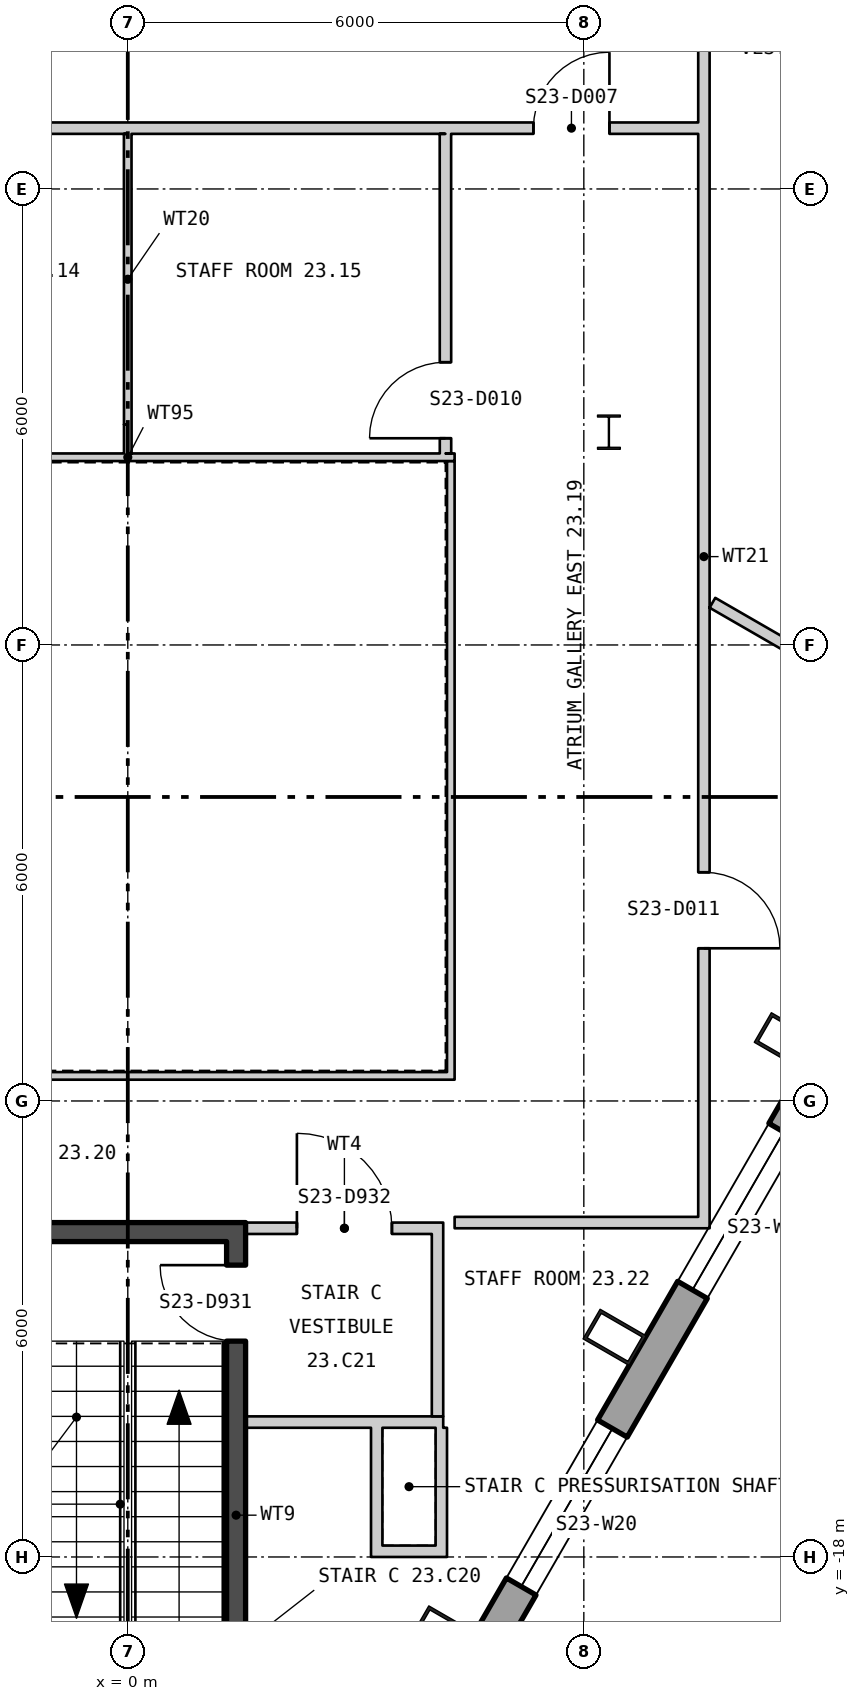
"""IFC4 building model, lengths in metres.
Left out: names, types, materials, properties, quantities, classifications, styles, units other than length and angle.
Written with IfcOpenShell. Run it as: python <this file> out.ifc"""

import sys

from ifc_helpers import new_model, si_unit, direction, frame, frame_2d, origin, origin_2d, place, context, subcontext, project, spatial, polyline, rectangle, hollow_rectangle, i_section, outline, extrude, element, fill, save


model = new_model("IFC4")
c1 = context("Model", 3, precision=1e-05, world=origin(), true_north=direction((0.0, 1.0)))
c2 = subcontext(c1, "Body", "Model", "MODEL_VIEW")
j1 = project(units=[si_unit("LENGTHUNIT", "METRE"), si_unit("PLANEANGLEUNIT", "RADIAN")], contexts=[c1])
p1 = place(None, origin())
s1 = spatial("IfcSite", under=j1, at=p1, CompositionType="ELEMENT")
p2 = place(p1, origin())
s2 = spatial("IfcBuilding", under=s1, at=p2, CompositionType="ELEMENT")
p3 = place(p2, frame((0.0, 0.0, 304.2)))
s3 = spatial("IfcBuildingStorey", under=s2, at=p3, CompositionType="ELEMENT", Elevation=304.2)
for number, where, z_axis, x_axis in (
    (1, (4.151, -19.013, 0.0), (0.0, 0.0, 1.0), (0.5, 0.866, 0.0)),
    (2, (6.405, -15.11, 0.0), (0.0, 0.0, 1.0), (0.5, 0.866, 0.0)),
    (3, (8.658, -11.208, 0.0), (0.0, 0.0, 1.0), (0.5, 0.866, 0.0)),
):
    element("IfcColumn", number, at=place(p3, frame(where, z_axis=z_axis, x_axis=x_axis)), inside=s3, PredefinedType="COLUMN", context=c2, shape_type="SweptSolid", body=[
        extrude(hollow_rectangle(XDim=0.45, YDim=0.7, WallThickness=0.04, at=origin_2d()), origin(), (0.0, 0.0, 1.0), 4.2),
    ])
p4 = place(p3, frame((6.33, -3.2, 0.0), z_axis=(0.0, 0.0, 1.0), x_axis=(1.0, 0.0, 0.0)))
e4 = element("IfcColumn", 4, at=p4, inside=s3, PredefinedType="COLUMN", context=c2, shape_type="SweptSolid", body=[
    extrude(i_section(OverallWidth=0.3, OverallDepth=0.45, WebThickness=0.014, FlangeThickness=0.026, at=origin_2d()), origin(), (0.0, 0.0, 1.0), 4.2),
])
p5 = place(p3, frame((2.23, -23.491, -0.18), z_axis=(0.0, 0.0, 1.0), x_axis=(0.500000141277, 0.866025322218, 0.0)))
e5 = element("IfcWall", 5, at=p5, inside=s3, PredefinedType="SOLIDWALL", context=c2, shape_type="SweptSolid", body=[
    extrude(outline(polyline([(-0.13, -0.225), (45.86, -0.225), (45.6, 0.225), (0.13, 0.225), (-0.13, -0.225)])), origin(), (0.0, 0.0, 1.0), 3.98),
])
p6 = place(p5, frame((1.424, 0.0, 1.08)))
e6 = element("IfcOpeningElement", 6, at=p6, cuts=e5, PredefinedType="OPENING", context=c2, shape_type="SweptSolid", body=[
    extrude(rectangle(XDim=2.4, YDim=2.3, at=frame_2d((1.2, 1.15))), frame((0.0, 0.235, 0.0), z_axis=(0.0, -1.0, 0.0), x_axis=(1.0, 0.0, 0.0)), (0.0, 0.0, 1.0), 0.47),
])
p7 = place(p5, frame((5.892, 0.0, 1.08)))
e7 = element("IfcOpeningElement", 7, at=p7, cuts=e5, PredefinedType="OPENING", context=c2, shape_type="SweptSolid", body=[
    extrude(rectangle(XDim=2.4, YDim=2.3, at=frame_2d((1.2, 1.15))), frame((0.0, 0.235, 0.0), z_axis=(0.0, -1.0, 0.0), x_axis=(1.0, 0.0, 0.0)), (0.0, 0.0, 1.0), 0.47),
])
p8 = place(p5, frame((10.399, 0.0, 1.08)))
e8 = element("IfcOpeningElement", 8, at=p8, cuts=e5, PredefinedType="OPENING", context=c2, shape_type="SweptSolid", body=[
    extrude(rectangle(XDim=2.4, YDim=2.3, at=frame_2d((1.2, 1.15))), frame((0.0, 0.235, 0.0), z_axis=(0.0, -1.0, 0.0), x_axis=(1.0, 0.0, 0.0)), (0.0, 0.0, 1.0), 0.47),
])
p9 = place(p5, frame((14.905, 0.0, 1.08)))
e9 = element("IfcOpeningElement", 9, at=p9, cuts=e5, PredefinedType="OPENING", context=c2, shape_type="SweptSolid", body=[
    extrude(rectangle(XDim=2.4, YDim=2.3, at=frame_2d((1.2, 1.15))), frame((0.0, 0.235, 0.0), z_axis=(0.0, -1.0, 0.0), x_axis=(1.0, 0.0, 0.0)), (0.0, 0.0, 1.0), 0.47),
])
p10 = place(p5, frame((19.412, 0.0, 1.08)))
e10 = element("IfcOpeningElement", 10, at=p10, cuts=e5, PredefinedType="OPENING", context=c2, shape_type="SweptSolid", body=[
    extrude(rectangle(XDim=2.4, YDim=2.3, at=frame_2d((1.2, 1.15))), frame((0.0, 0.235, 0.0), z_axis=(0.0, -1.0, 0.0), x_axis=(1.0, 0.0, 0.0)), (0.0, 0.0, 1.0), 0.47),
])
p11 = place(p5, frame((23.918, 0.0, 1.08)))
e11 = element("IfcOpeningElement", 11, at=p11, cuts=e5, PredefinedType="OPENING", context=c2, shape_type="SweptSolid", body=[
    extrude(rectangle(XDim=2.4, YDim=2.3, at=frame_2d((1.2, 1.15))), frame((0.0, 0.235, 0.0), z_axis=(0.0, -1.0, 0.0), x_axis=(1.0, 0.0, 0.0)), (0.0, 0.0, 1.0), 0.47),
])
p12 = place(p5, frame((28.425, 0.0, 1.08)))
e12 = element("IfcOpeningElement", 12, at=p12, cuts=e5, PredefinedType="OPENING", context=c2, shape_type="SweptSolid", body=[
    extrude(rectangle(XDim=2.4, YDim=2.3, at=frame_2d((1.2, 1.15))), frame((0.0, 0.235, 0.0), z_axis=(0.0, -1.0, 0.0), x_axis=(1.0, 0.0, 0.0)), (0.0, 0.0, 1.0), 0.47),
])
p13 = place(p5, frame((32.932, 0.0, 1.08)))
e13 = element("IfcOpeningElement", 13, at=p13, cuts=e5, PredefinedType="OPENING", context=c2, shape_type="SweptSolid", body=[
    extrude(rectangle(XDim=2.4, YDim=2.3, at=frame_2d((1.2, 1.15))), frame((0.0, 0.235, 0.0), z_axis=(0.0, -1.0, 0.0), x_axis=(1.0, 0.0, 0.0)), (0.0, 0.0, 1.0), 0.47),
])
p14 = place(p5, frame((37.438, 0.0, 1.08)))
e14 = element("IfcOpeningElement", 14, at=p14, cuts=e5, PredefinedType="OPENING", context=c2, shape_type="SweptSolid", body=[
    extrude(rectangle(XDim=2.4, YDim=2.3, at=frame_2d((1.2, 1.15))), frame((0.0, 0.235, 0.0), z_axis=(0.0, -1.0, 0.0), x_axis=(1.0, 0.0, 0.0)), (0.0, 0.0, 1.0), 0.47),
])
p15 = place(p5, frame((41.907, 0.0, 1.08)))
e15 = element("IfcOpeningElement", 15, at=p15, cuts=e5, PredefinedType="OPENING", context=c2, shape_type="SweptSolid", body=[
    extrude(rectangle(XDim=2.4, YDim=2.3, at=frame_2d((1.2, 1.15))), frame((0.0, 0.235, 0.0), z_axis=(0.0, -1.0, 0.0), x_axis=(1.0, 0.0, 0.0)), (0.0, 0.0, 1.0), 0.47),
])
p16 = place(p3, frame((-4.3, -11.67, 0.0), z_axis=(0.0, 0.0, 1.0), x_axis=(1.0, 0.0, 0.0)))
e16 = element("IfcWall", 16, at=p16, inside=s3, PredefinedType="PARTITIONING", context=c2, shape_type="SweptSolid", body=[
    extrude(rectangle(XDim=8.6, YDim=0.1, at=frame_2d((4.3, 0.0))), origin(), (0.0, 0.0, 1.0), 4.0),
])
p17 = place(p3, frame((4.25, -11.62, 0.0), z_axis=(0.0, 0.0, 1.0), x_axis=(0.0, 1.0, 0.0)))
e17 = element("IfcWall", 17, at=p17, inside=s3, PredefinedType="PARTITIONING", context=c2, shape_type="SweptSolid", body=[
    extrude(rectangle(XDim=8.04, YDim=0.1, at=frame_2d((4.02, 0.0))), origin(), (0.0, 0.0, 1.0), 4.0),
])
p18 = place(p3, frame((4.3, -3.53, 0.0), z_axis=(0.0, 0.0, 1.0), x_axis=(-1.0, 0.0, 0.0)))
e18 = element("IfcWall", 18, at=p18, inside=s3, PredefinedType="PARTITIONING", context=c2, shape_type="SweptSolid", body=[
    extrude(rectangle(XDim=8.6, YDim=0.1, at=frame_2d((4.3, 0.0))), origin(), (0.0, 0.0, 1.0), 4.0),
])
p19 = place(p3, frame((1.425, -21.05, 0.0), z_axis=(0.0, 0.0, 1.0), x_axis=(0.0, 1.0, 0.0)))
e19 = element("IfcWall", 19, at=p19, inside=s3, PredefinedType="SHEAR", context=c2, shape_type="SweptSolid", body=[
    extrude(rectangle(XDim=7.2, YDim=0.25, at=frame_2d((3.6, 0.0))), origin(), (0.0, 0.0, 1.0), 4.0),
])
p20 = place(p19, frame((5.89, 0.0, 0.0)))
e20 = element("IfcOpeningElement", 20, at=p20, cuts=e19, PredefinedType="OPENING", context=c2, shape_type="SweptSolid", body=[
    extrude(rectangle(XDim=1.0, YDim=2.1, at=frame_2d((0.5, 1.05))), frame((0.0, 0.135, 0.0), z_axis=(0.0, -1.0, 0.0), x_axis=(1.0, 0.0, 0.0)), (0.0, 0.0, 1.0), 0.27),
])
p21 = place(p3, frame((-1.55, -13.725, 0.0), z_axis=(0.0, 0.0, 1.0), x_axis=(1.0, 0.0, 0.0)))
e21 = element("IfcWall", 21, at=p21, inside=s3, PredefinedType="SHEAR", context=c2, shape_type="SweptSolid", body=[
    extrude(rectangle(XDim=3.1, YDim=0.25, at=frame_2d((1.55, 0.0))), origin(), (0.0, 0.0, 1.0), 4.0),
])
p22 = place(p3, frame((1.55, -16.225, 0.0), z_axis=(0.0, 0.0, 1.0), x_axis=(1.0, 0.0, 0.0)))
e22 = element("IfcWall", 22, at=p22, inside=s3, PredefinedType="PARTITIONING", context=c2, shape_type="SweptSolid", body=[
    extrude(rectangle(XDim=2.6, YDim=0.15, at=frame_2d((1.3, 0.0))), origin(), (0.0, 0.0, 1.0), 4.0),
])
p23 = place(p3, frame((4.075, -16.15, 0.0), z_axis=(0.0, 0.0, 1.0), x_axis=(0.0, 1.0, 0.0)))
e23 = element("IfcWall", 23, at=p23, inside=s3, PredefinedType="PARTITIONING", context=c2, shape_type="SweptSolid", body=[
    extrude(rectangle(XDim=2.4, YDim=0.15, at=frame_2d((1.2, 0.0))), origin(), (0.0, 0.0, 1.0), 4.0),
])
p24 = place(p3, frame((1.55, -13.675, 0.0), z_axis=(0.0, 0.0, 1.0), x_axis=(1.0, 0.0, 0.0)))
e24 = element("IfcWall", 24, at=p24, inside=s3, PredefinedType="PARTITIONING", context=c2, shape_type="SweptSolid", body=[
    extrude(rectangle(XDim=2.6, YDim=0.15, at=frame_2d((1.3, 0.0))), origin(), (0.0, 0.0, 1.0), 3.186),
])
p25 = place(p24, frame((0.675, 0.0, 0.0)))
e25 = element("IfcOpeningElement", 25, at=p25, cuts=e24, PredefinedType="OPENING", context=c2, shape_type="SweptSolid", body=[
    extrude(rectangle(XDim=1.25, YDim=2.1, at=frame_2d((0.625, 1.05))), frame((0.0, 0.085, 0.0), z_axis=(0.0, -1.0, 0.0), x_axis=(1.0, 0.0, 0.0)), (0.0, 0.0, 1.0), 0.17),
])
p26 = place(p3, frame((3.275, -18.0, 0.0), z_axis=(0.0, 0.0, 1.0), x_axis=(0.0, 1.0, 0.0)))
e26 = element("IfcWall", 26, at=p26, inside=s3, PredefinedType="PARTITIONING", context=c2, shape_type="SweptSolid", body=[
    extrude(rectangle(XDim=1.7, YDim=0.15, at=frame_2d((0.85, 0.0))), origin(), (0.0, 0.0, 1.0), 3.55),
])
p27 = place(p3, frame((3.35, -17.925, 0.0), z_axis=(0.0, 0.0, 1.0), x_axis=(1.0, 0.0, 0.0)))
e27 = element("IfcWall", 27, at=p27, inside=s3, PredefinedType="PARTITIONING", context=c2, shape_type="SweptSolid", body=[
    extrude(rectangle(XDim=0.7, YDim=0.15, at=frame_2d((0.35, 0.0))), origin(), (0.0, 0.0, 1.0), 4.0),
])
p28 = place(p3, frame((4.125, -18.0, 0.0), z_axis=(0.0, 0.0, 1.0), x_axis=(0.0, 1.0, 0.0)))
e28 = element("IfcWall", 28, at=p28, inside=s3, PredefinedType="PARTITIONING", context=c2, shape_type="SweptSolid", body=[
    extrude(rectangle(XDim=1.7, YDim=0.15, at=frame_2d((0.85, 0.0))), origin(), (0.0, 0.0, 1.0), 4.0),
])
p29 = place(p3, frame((-7.58, 0.8, 0.0), z_axis=(0.0, 0.0, 1.0), x_axis=(1.0, 0.0, 0.0)))
e29 = element("IfcWall", 29, at=p29, inside=s3, PredefinedType="PARTITIONING", context=c2, shape_type="SweptSolid", body=[
    extrude(rectangle(XDim=15.085, YDim=0.15, at=frame_2d((7.543, 0.0))), origin(), (0.0, 0.0, 1.0), 4.0),
])
p30 = place(p29, frame((1.206, 0.0, 0.0)))
e30 = element("IfcOpeningElement", 30, at=p30, cuts=e29, PredefinedType="OPENING", context=c2, shape_type="SweptSolid", body=[
    extrude(rectangle(XDim=1.0, YDim=2.1, at=frame_2d((0.5, 1.05))), frame((0.0, 0.085, 0.0), z_axis=(0.0, -1.0, 0.0), x_axis=(1.0, 0.0, 0.0)), (0.0, 0.0, 1.0), 0.17),
])
p31 = place(p29, frame((12.917, 0.0, 0.0)))
e31 = element("IfcOpeningElement", 31, at=p31, cuts=e29, PredefinedType="OPENING", context=c2, shape_type="SweptSolid", body=[
    extrude(rectangle(XDim=1.0, YDim=2.1, at=frame_2d((0.5, 1.05))), frame((0.0, 0.085, 0.0), z_axis=(0.0, -1.0, 0.0), x_axis=(1.0, 0.0, 0.0)), (0.0, 0.0, 1.0), 0.17),
])
p32 = place(p3, frame((-0.001, 0.725, 0.0), z_axis=(0.0, 0.0, 1.0), x_axis=(0.000235294111, -0.999999972318, 0.0)))
e32 = element("IfcWall", 32, at=p32, inside=s3, PredefinedType="PARTITIONING", context=c2, shape_type="SweptSolid", body=[
    extrude(rectangle(XDim=3.825, YDim=0.1, at=frame_2d((1.913, 0.0))), origin(), (0.0, 0.0, 1.0), 3.55),
])
p33 = place(p3, frame((-0.0, -3.1, 0.0), z_axis=(0.0, 0.0, 1.0), x_axis=(0.000263157886, -0.999999965374, 0.0)))
e33 = element("IfcWall", 33, at=p33, inside=s3, PredefinedType="PARTITIONING", context=c2, shape_type="SweptSolid", body=[
    extrude(rectangle(XDim=0.38, YDim=0.1, at=frame_2d((0.19, 0.0))), origin(), (0.0, 0.0, 1.0), 4.0),
])
p34 = place(p3, frame((4.179, 0.725, 0.0), z_axis=(0.0, 0.0, 1.0), x_axis=(0.000237812122, -0.999999971723, 0.0)))
e34 = element("IfcWall", 34, at=p34, inside=s3, PredefinedType="PARTITIONING", context=c2, shape_type="SweptSolid", body=[
    extrude(rectangle(XDim=4.205, YDim=0.15, at=frame_2d((2.103, 0.0))), origin(), (0.0, 0.0, 1.0), 4.0),
])
p35 = place(p34, frame((3.005, 0.0, 0.0)))
e35 = element("IfcOpeningElement", 35, at=p35, cuts=e34, PredefinedType="OPENING", context=c2, shape_type="SweptSolid", body=[
    extrude(rectangle(XDim=1.0, YDim=2.1, at=frame_2d((0.5, 1.05))), frame((0.0, 0.085, 0.0), z_axis=(0.0, -1.0, 0.0), x_axis=(1.0, 0.0, 0.0)), (0.0, 0.0, 1.0), 0.17),
])
p36 = place(p3, frame((4.3, -13.6, 0.0), z_axis=(0.0, 0.0, 1.0), x_axis=(1.0, 0.0, 0.0)))
e36 = element("IfcWall", 36, at=p36, inside=s3, PredefinedType="PARTITIONING", context=c2, shape_type="SweptSolid", body=[
    extrude(rectangle(XDim=2.775, YDim=0.15, at=frame_2d((1.387, 0.0))), origin(), (0.0, 0.0, 1.0), 3.186),
])
p37 = place(p3, frame((7.075, -13.6, 0.0), z_axis=(0.0, 0.0, 1.0), x_axis=(1.0, 0.0, 0.0)))
e37 = element("IfcWall", 37, at=p37, inside=s3, PredefinedType="PARTITIONING", context=c2, shape_type="SweptSolid", body=[
    extrude(rectangle(XDim=0.43, YDim=0.15, at=frame_2d((0.215, 0.0))), origin(), (0.0, 0.0, 1.0), 4.0),
])
p38 = place(p3, frame((7.58, -13.675, 0.0), z_axis=(0.0, 0.0, 1.0), x_axis=(0.0, 1.0, 0.0)))
e38 = element("IfcWall", 38, at=p38, inside=s3, PredefinedType="PARTITIONING", context=c2, shape_type="SweptSolid", body=[
    extrude(rectangle(XDim=17.675, YDim=0.15, at=frame_2d((8.838, 0.0))), origin(), (0.0, 0.0, 1.0), 4.0),
])
p39 = place(p38, frame((3.684, 0.0, 0.0)))
e39 = element("IfcOpeningElement", 39, at=p39, cuts=e38, PredefinedType="OPENING", context=c2, shape_type="SweptSolid", body=[
    extrude(rectangle(XDim=1.0, YDim=2.1, at=frame_2d((0.5, 1.05))), frame((0.0, 0.085, 0.0), z_axis=(0.0, -1.0, 0.0), x_axis=(1.0, 0.0, 0.0)), (0.0, 0.0, 1.0), 0.17),
])
p40 = place(p38, frame((16.275, 0.0, 0.0)))
e40 = element("IfcOpeningElement", 40, at=p40, cuts=e38, PredefinedType="OPENING", context=c2, shape_type="SweptSolid", body=[
    extrude(rectangle(XDim=1.0, YDim=2.1, at=frame_2d((0.5, 1.05))), frame((0.0, 0.085, 0.0), z_axis=(0.0, -1.0, 0.0), x_axis=(1.0, 0.0, 0.0)), (0.0, 0.0, 1.0), 0.17),
])
p41 = place(p3, frame((7.692, -5.445, 0.0), z_axis=(0.0, 0.0, 1.0), x_axis=(0.866194788555, -0.49970650214, 0.0)))
e41 = element("IfcWall", 41, at=p41, inside=s3, PredefinedType="PARTITIONING", context=c2, shape_type="SweptSolid", body=[
    extrude(rectangle(XDim=3.618, YDim=0.15, at=frame_2d((1.809, 0.0))), origin(), (0.0, 0.0, 1.0), 4.0),
])
p42 = place(p7, origin())
e42 = element("IfcWindow", 42, at=p42, inside=s3, PartitioningType="SINGLE_PANEL", PredefinedType="WINDOW", context=c2, shape_type="SweptSolid", body=[
    extrude(rectangle(XDim=2.4, YDim=2.3, at=frame_2d((1.2, 1.15))), frame((0.0, 0.105, 0.0), z_axis=(0.0, -1.0, 0.0), x_axis=(1.0, 0.0, 0.0)), (0.0, 0.0, 1.0), 0.06),
])
fill(e7, e42)
p43 = place(p8, origin())
e43 = element("IfcWindow", 43, at=p43, inside=s3, PartitioningType="SINGLE_PANEL", PredefinedType="WINDOW", context=c2, shape_type="SweptSolid", body=[
    extrude(rectangle(XDim=2.4, YDim=2.3, at=frame_2d((1.2, 1.15))), frame((0.0, 0.105, 0.0), z_axis=(0.0, -1.0, 0.0), x_axis=(1.0, 0.0, 0.0)), (0.0, 0.0, 1.0), 0.06),
])
fill(e8, e43)
p44 = place(p20, origin())
e44 = element("IfcDoor", 44, at=p44, inside=s3, OperationType="SINGLE_SWING_LEFT", PredefinedType="DOOR", context=c2, shape_type="SweptSolid", body=[
    extrude(rectangle(XDim=1.0, YDim=2.1, at=frame_2d((0.5, 1.05))), frame((0.0, 0.025, 0.0), z_axis=(0.0, -1.0, 0.0), x_axis=(1.0, 0.0, 0.0)), (0.0, 0.0, 1.0), 0.05),
])
fill(e20, e44)
p45 = place(p25, origin())
e45 = element("IfcDoor", 45, at=p45, inside=s3, OperationType="SINGLE_SWING_RIGHT", PredefinedType="DOOR", context=c2, shape_type="SweptSolid", body=[
    extrude(rectangle(XDim=1.25, YDim=2.1, at=frame_2d((0.625, 1.05))), frame((0.0, 0.025, 0.0), z_axis=(0.0, -1.0, 0.0), x_axis=(1.0, 0.0, 0.0)), (0.0, 0.0, 1.0), 0.05),
])
fill(e25, e45)
p46 = place(p31, origin())
e46 = element("IfcDoor", 46, at=p46, inside=s3, OperationType="SINGLE_SWING_LEFT", PredefinedType="DOOR", context=c2, shape_type="SweptSolid", body=[
    extrude(rectangle(XDim=1.0, YDim=2.1, at=frame_2d((0.5, 1.05))), frame((0.0, 0.025, 0.0), z_axis=(0.0, -1.0, 0.0), x_axis=(1.0, 0.0, 0.0)), (0.0, 0.0, 1.0), 0.05),
])
fill(e31, e46)
p47 = place(p35, origin())
e47 = element("IfcDoor", 47, at=p47, inside=s3, OperationType="SINGLE_SWING_RIGHT", PredefinedType="DOOR", context=c2, shape_type="SweptSolid", body=[
    extrude(rectangle(XDim=1.0, YDim=2.1, at=frame_2d((0.5, 1.05))), frame((0.0, 0.025, 0.0), z_axis=(0.0, -1.0, 0.0), x_axis=(1.0, 0.0, 0.0)), (0.0, 0.0, 1.0), 0.05),
])
fill(e35, e47)
p48 = place(p39, origin())
e48 = element("IfcDoor", 48, at=p48, inside=s3, OperationType="SINGLE_SWING_LEFT", PredefinedType="DOOR", context=c2, shape_type="SweptSolid", body=[
    extrude(rectangle(XDim=1.0, YDim=2.1, at=frame_2d((0.5, 1.05))), frame((0.0, 0.025, 0.0), z_axis=(0.0, -1.0, 0.0), x_axis=(1.0, 0.0, 0.0)), (0.0, 0.0, 1.0), 0.05),
])
fill(e39, e48)
save(model, sys.argv[1])
